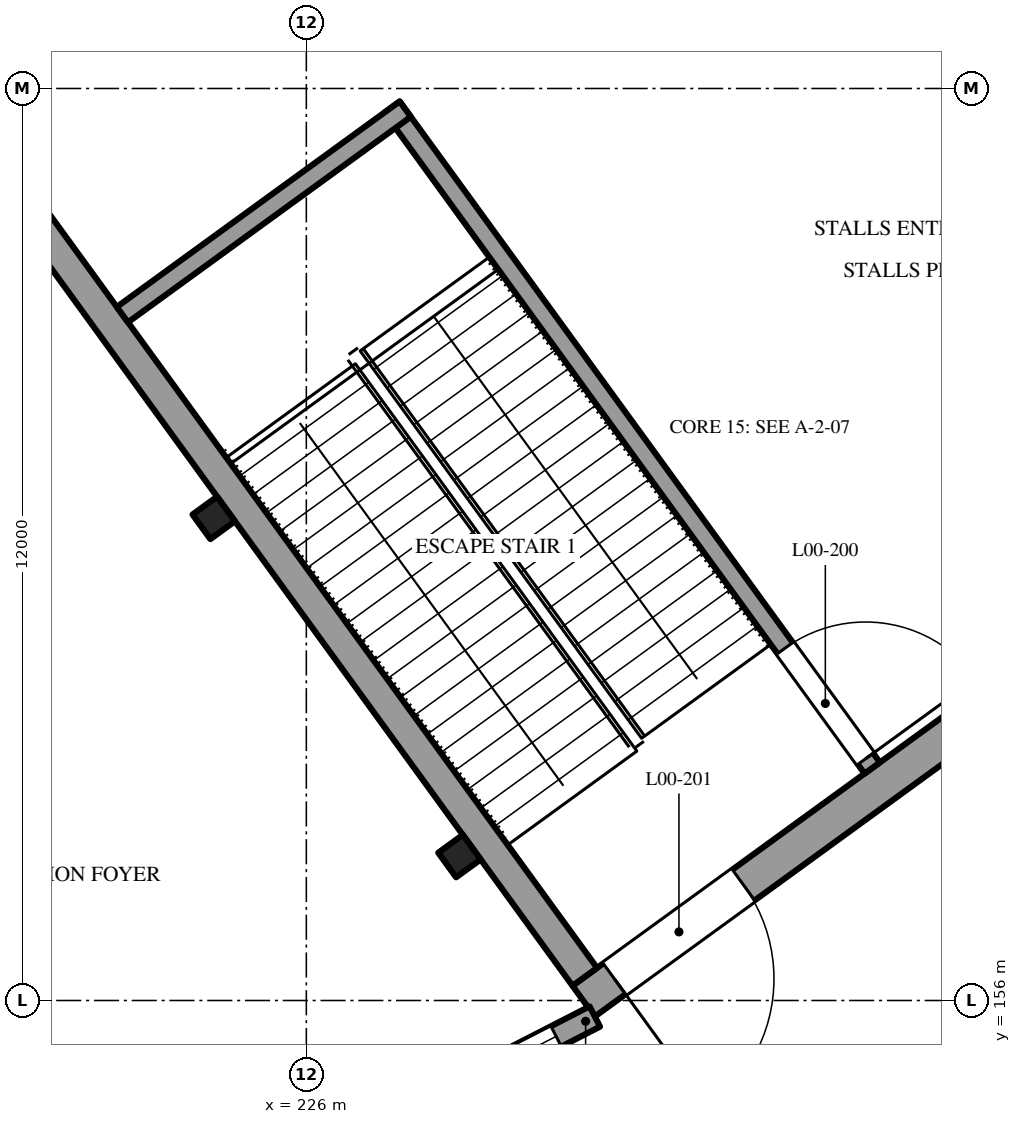
"""IFC4 building model, lengths in metres.
Left out: names, types, materials, properties, quantities, classifications, styles, units other than length and angle.
Written with IfcOpenShell. Run it as: python <this file> out.ifc"""

import sys

from ifc_helpers import new_model, si_unit, direction, frame, frame_2d, origin, origin_2d, place, context, subcontext, project, spatial, rectangle, extrude, element, fill, save


model = new_model("IFC4")
c1 = context("Model", 3, precision=1e-05, world=origin(), true_north=direction((0.0, 1.0)))
c2 = subcontext(c1, "Body", "Model", "MODEL_VIEW")
j1 = project(units=[si_unit("LENGTHUNIT", "METRE"), si_unit("PLANEANGLEUNIT", "RADIAN")], contexts=[c1])
p1 = place(None, origin())
s1 = spatial("IfcSite", under=j1, at=p1, CompositionType="ELEMENT")
p2 = place(p1, origin())
s2 = spatial("IfcBuilding", under=s1, at=p2, CompositionType="ELEMENT")
p3 = place(p2, origin())
s3 = spatial("IfcBuildingStorey", under=s2, at=p3, CompositionType="ELEMENT", Elevation=0.0)
p4 = place(p3, frame((229.649, 155.991, -0.3), z_axis=(0.0, 0.0, 1.0), x_axis=(0.809016008294, 0.587786609514, 0.0)))
e1 = element("IfcWall", 1, at=p4, inside=s3, PredefinedType="SOLIDWALL", context=c2, shape_type="SweptSolid", body=[
    extrude(rectangle(XDim=60.4, YDim=0.5, at=frame_2d((30.2, 0.0))), origin(), (0.0, 0.0, 1.0), 7.5),
])
p5 = place(p4, frame((41.2, 0.0, 0.3)))
e2 = element("IfcOpeningElement", 2, at=p5, cuts=e1, PredefinedType="OPENING", context=c2, shape_type="SweptSolid", body=[
    extrude(rectangle(XDim=2.4, YDim=2.4, at=frame_2d((1.2, 1.2))), frame((0.0, 0.26, 0.0), z_axis=(0.0, -1.0, 0.0), x_axis=(1.0, 0.0, 0.0)), (0.0, 0.0, 1.0), 0.52),
])
p6 = place(p4, frame((33.2, 0.0, 0.3)))
e3 = element("IfcOpeningElement", 3, at=p6, cuts=e1, PredefinedType="OPENING", context=c2, shape_type="SweptSolid", body=[
    extrude(rectangle(XDim=2.4, YDim=2.4, at=frame_2d((1.2, 1.2))), frame((0.0, 0.26, 0.0), z_axis=(0.0, -1.0, 0.0), x_axis=(1.0, 0.0, 0.0)), (0.0, 0.0, 1.0), 0.52),
])
p7 = place(p4, frame((0.5, 0.0, 0.3)))
e4 = element("IfcOpeningElement", 4, at=p7, cuts=e1, PredefinedType="OPENING", context=c2, shape_type="SweptSolid", body=[
    extrude(rectangle(XDim=2.1, YDim=2.1, at=frame_2d((1.05, 1.05))), frame((0.0, 0.26, 0.0), z_axis=(0.0, -1.0, 0.0), x_axis=(1.0, 0.0, 0.0)), (0.0, 0.0, 1.0), 0.52),
])
p8 = place(p4, frame((15.6, 0.0, 0.3)))
e5 = element("IfcOpeningElement", 5, at=p8, cuts=e1, PredefinedType="OPENING", context=c2, shape_type="SweptSolid", body=[
    extrude(rectangle(XDim=2.1, YDim=2.1, at=frame_2d((1.05, 1.05))), frame((0.0, 0.26, 0.0), z_axis=(0.0, -1.0, 0.0), x_axis=(1.0, 0.0, 0.0)), (0.0, 0.0, 1.0), 0.52),
])
p9 = place(p4, frame((50.75, 0.0, 2.4)))
e6 = element("IfcOpeningElement", 6, at=p9, cuts=e1, PredefinedType="OPENING", context=c2, shape_type="SweptSolid", body=[
    extrude(rectangle(XDim=1.2, YDim=1.2, at=frame_2d((0.6, 0.6))), frame((0.0, 0.26, 0.0), z_axis=(0.0, -1.0, 0.0), x_axis=(1.0, 0.0, 0.0)), (0.0, 0.0, 1.0), 0.52),
])
p10 = place(p4, frame((53.45, 0.0, 2.4)))
e7 = element("IfcOpeningElement", 7, at=p10, cuts=e1, PredefinedType="OPENING", context=c2, shape_type="SweptSolid", body=[
    extrude(rectangle(XDim=1.5, YDim=1.2, at=frame_2d((0.75, 0.6))), frame((0.0, 0.26, 0.0), z_axis=(0.0, -1.0, 0.0), x_axis=(1.0, 0.0, 0.0)), (0.0, 0.0, 1.0), 0.52),
])
p11 = place(p4, frame((57.35, 0.0, 2.4)))
e8 = element("IfcOpeningElement", 8, at=p11, cuts=e1, PredefinedType="OPENING", context=c2, shape_type="SweptSolid", body=[
    extrude(rectangle(XDim=1.5, YDim=1.2, at=frame_2d((0.75, 0.6))), frame((0.0, 0.26, 0.0), z_axis=(0.0, -1.0, 0.0), x_axis=(1.0, 0.0, 0.0)), (0.0, 0.0, 1.0), 0.52),
])
p12 = place(p3, frame((229.664, 156.311, -0.3), z_axis=(0.0, 0.0, 1.0), x_axis=(-0.587784977279, 0.809017194184, 0.0)))
e9 = element("IfcWall", 9, at=p12, inside=s3, PredefinedType="SOLIDWALL", context=c2, shape_type="SweptSolid", body=[
    extrude(rectangle(XDim=53.5, YDim=0.4, at=frame_2d((26.75, 0.0))), origin(), (0.0, 0.0, 1.0), 7.5),
])
p13 = place(p12, frame((13.3, 0.0, 0.3)))
e10 = element("IfcOpeningElement", 10, at=p13, cuts=e9, PredefinedType="OPENING", context=c2, shape_type="SweptSolid", body=[
    extrude(rectangle(XDim=2.4, YDim=2.4, at=frame_2d((1.2, 1.2))), frame((0.0, 0.21, 0.0), z_axis=(0.0, -1.0, 0.0), x_axis=(1.0, 0.0, 0.0)), (0.0, 0.0, 1.0), 0.42),
])
p14 = place(p12, frame((16.8, 0.0, 0.3)))
e11 = element("IfcOpeningElement", 11, at=p14, cuts=e9, PredefinedType="OPENING", context=c2, shape_type="SweptSolid", body=[
    extrude(rectangle(XDim=2.4, YDim=2.4, at=frame_2d((1.2, 1.2))), frame((0.0, 0.21, 0.0), z_axis=(0.0, -1.0, 0.0), x_axis=(1.0, 0.0, 0.0)), (0.0, 0.0, 1.0), 0.42),
])
p15 = place(p12, frame((20.3, 0.0, 0.3)))
e12 = element("IfcOpeningElement", 12, at=p15, cuts=e9, PredefinedType="OPENING", context=c2, shape_type="SweptSolid", body=[
    extrude(rectangle(XDim=2.4, YDim=2.4, at=frame_2d((1.2, 1.2))), frame((0.0, 0.21, 0.0), z_axis=(0.0, -1.0, 0.0), x_axis=(1.0, 0.0, 0.0)), (0.0, 0.0, 1.0), 0.42),
])
p16 = place(p12, frame((23.8, 0.0, 0.3)))
e13 = element("IfcOpeningElement", 13, at=p16, cuts=e9, PredefinedType="OPENING", context=c2, shape_type="SweptSolid", body=[
    extrude(rectangle(XDim=2.4, YDim=2.4, at=frame_2d((1.2, 1.2))), frame((0.0, 0.21, 0.0), z_axis=(0.0, -1.0, 0.0), x_axis=(1.0, 0.0, 0.0)), (0.0, 0.0, 1.0), 0.42),
])
p17 = place(p12, frame((27.3, 0.0, 0.3)))
e14 = element("IfcOpeningElement", 14, at=p17, cuts=e9, PredefinedType="OPENING", context=c2, shape_type="SweptSolid", body=[
    extrude(rectangle(XDim=2.4, YDim=2.4, at=frame_2d((1.2, 1.2))), frame((0.0, 0.21, 0.0), z_axis=(0.0, -1.0, 0.0), x_axis=(1.0, 0.0, 0.0)), (0.0, 0.0, 1.0), 0.42),
])
p18 = place(p12, frame((30.8, 0.0, 0.3)))
e15 = element("IfcOpeningElement", 15, at=p18, cuts=e9, PredefinedType="OPENING", context=c2, shape_type="SweptSolid", body=[
    extrude(rectangle(XDim=2.4, YDim=2.4, at=frame_2d((1.2, 1.2))), frame((0.0, 0.21, 0.0), z_axis=(0.0, -1.0, 0.0), x_axis=(1.0, 0.0, 0.0)), (0.0, 0.0, 1.0), 0.42),
])
p19 = place(p12, frame((34.3, 0.0, 0.3)))
e16 = element("IfcOpeningElement", 16, at=p19, cuts=e9, PredefinedType="OPENING", context=c2, shape_type="SweptSolid", body=[
    extrude(rectangle(XDim=2.4, YDim=2.4, at=frame_2d((1.2, 1.2))), frame((0.0, 0.21, 0.0), z_axis=(0.0, -1.0, 0.0), x_axis=(1.0, 0.0, 0.0)), (0.0, 0.0, 1.0), 0.42),
])
p20 = place(p12, frame((37.8, 0.0, 0.3)))
e17 = element("IfcOpeningElement", 17, at=p20, cuts=e9, PredefinedType="OPENING", context=c2, shape_type="SweptSolid", body=[
    extrude(rectangle(XDim=2.4, YDim=2.4, at=frame_2d((1.2, 1.2))), frame((0.0, 0.21, 0.0), z_axis=(0.0, -1.0, 0.0), x_axis=(1.0, 0.0, 0.0)), (0.0, 0.0, 1.0), 0.42),
])
for number, where, z_axis, x_axis in (
    (18, (228.015, 157.9, -0.3), (0.0, 0.0, 1.0), (0.809, 0.588, 0.0)),
    (19, (224.782, 162.35, -0.3), (0.0, 0.0, 1.0), (0.809, 0.588, 0.0)),
):
    element("IfcColumn", number, at=place(p3, frame(where, z_axis=z_axis, x_axis=x_axis)), inside=s3, PredefinedType="COLUMN", context=c2, shape_type="SweptSolid", body=[
        extrude(rectangle(XDim=0.4, YDim=0.4, at=origin_2d()), origin(), (0.0, 0.0, 1.0), 7.5),
    ])
p21 = place(p3, frame((233.446, 159.059, 0.0), z_axis=(0.0, 0.0, 1.0), x_axis=(-0.587801633775, 0.809005092278, 0.0)))
e20 = element("IfcWall", 20, at=p21, inside=s3, PredefinedType="SOLIDWALL", context=c2, shape_type="SweptSolid", body=[
    extrude(rectangle(XDim=10.75, YDim=0.25, at=frame_2d((5.375, 0.0))), origin(), (0.0, 0.0, 1.0), 7.2),
])
p22 = place(p21, frame((0.15, 0.0, 0.0)))
e21 = element("IfcOpeningElement", 21, at=p22, cuts=e20, PredefinedType="OPENING", context=c2, shape_type="SweptSolid", body=[
    extrude(rectangle(XDim=1.8, YDim=2.1, at=frame_2d((0.9, 1.05))), frame((0.0, 0.135, 0.0), z_axis=(0.0, -1.0, 0.0), x_axis=(1.0, 0.0, 0.0)), (0.0, 0.0, 1.0), 0.27),
])
p23 = place(p3, frame((223.58, 165.024, 0.0), z_axis=(0.0, 0.0, 1.0), x_axis=(0.809009113768, 0.587796098864, 0.0)))
e22 = element("IfcWall", 22, at=p23, inside=s3, PredefinedType="SOLIDWALL", context=c2, shape_type="SweptSolid", body=[
    extrude(rectangle(XDim=4.6, YDim=0.25, at=frame_2d((2.3, 0.0))), origin(), (0.0, 0.0, 1.0), 7.2),
])
p24 = place(p3, frame((218.0, 149.73, -0.3), z_axis=(0.0, 0.0, 1.0), x_axis=(0.889510193678, 0.456915326228, 0.0)))
e23 = element("IfcWall", 23, at=p24, inside=s3, PredefinedType="SOLIDWALL", context=c2, shape_type="SweptSolid", body=[
    extrude(rectangle(XDim=13.261, YDim=0.3, at=frame_2d((6.63, 0.0))), origin(), (0.0, 0.0, 1.0), 7.5),
])
p25 = place(p24, frame((0.572, 0.0, 0.3)))
e24 = element("IfcOpeningElement", 24, at=p25, cuts=e23, PredefinedType="OPENING", context=c2, shape_type="SweptSolid", body=[
    extrude(rectangle(XDim=2.6, YDim=6.0, at=frame_2d((1.3, 3.0))), frame((0.0, 0.16, 0.0), z_axis=(0.0, -1.0, 0.0), x_axis=(1.0, 0.0, 0.0)), (0.0, 0.0, 1.0), 0.32),
])
p26 = place(p24, frame((3.744, 0.0, 0.3)))
e25 = element("IfcOpeningElement", 25, at=p26, cuts=e23, PredefinedType="OPENING", context=c2, shape_type="SweptSolid", body=[
    extrude(rectangle(XDim=2.6, YDim=6.0, at=frame_2d((1.3, 3.0))), frame((0.0, 0.16, 0.0), z_axis=(0.0, -1.0, 0.0), x_axis=(1.0, 0.0, 0.0)), (0.0, 0.0, 1.0), 0.32),
])
p27 = place(p24, frame((6.917, 0.0, 0.3)))
e26 = element("IfcOpeningElement", 26, at=p27, cuts=e23, PredefinedType="OPENING", context=c2, shape_type="SweptSolid", body=[
    extrude(rectangle(XDim=2.6, YDim=6.0, at=frame_2d((1.3, 3.0))), frame((0.0, 0.16, 0.0), z_axis=(0.0, -1.0, 0.0), x_axis=(1.0, 0.0, 0.0)), (0.0, 0.0, 1.0), 0.32),
])
p28 = place(p24, frame((10.089, 0.0, 0.3)))
e27 = element("IfcOpeningElement", 27, at=p28, cuts=e23, PredefinedType="OPENING", context=c2, shape_type="SweptSolid", body=[
    extrude(rectangle(XDim=2.6, YDim=6.0, at=frame_2d((1.3, 3.0))), frame((0.0, 0.16, 0.0), z_axis=(0.0, -1.0, 0.0), x_axis=(1.0, 0.0, 0.0)), (0.0, 0.0, 1.0), 0.32),
])
p29 = place(p22, frame((1.8, 0.0, 0.0), z_axis=(0.0, 0.0, 1.0), x_axis=(-1.0, 0.0, 0.0)))
e28 = element("IfcDoor", 28, at=p29, inside=s3, OperationType="DOUBLE_DOOR_SINGLE_SWING", PredefinedType="DOOR", context=c2, shape_type="SweptSolid", body=[
    extrude(rectangle(XDim=1.8, YDim=2.1, at=frame_2d((0.9, 1.05))), frame((0.0, 0.025, 0.0), z_axis=(0.0, -1.0, 0.0), x_axis=(1.0, 0.0, 0.0)), (0.0, 0.0, 1.0), 0.05),
])
fill(e21, e28)
p30 = place(p7, frame((2.1, 0.0, 0.0), z_axis=(0.0, 0.0, 1.0), x_axis=(-1.0, 0.0, 0.0)))
e29 = element("IfcDoor", 29, at=p30, inside=s3, OperationType="DOUBLE_DOOR_SINGLE_SWING", PredefinedType="DOOR", context=c2, shape_type="SweptSolid", body=[
    extrude(rectangle(XDim=2.1, YDim=2.1, at=frame_2d((1.05, 1.05))), frame((0.0, 0.025, 0.0), z_axis=(0.0, -1.0, 0.0), x_axis=(1.0, 0.0, 0.0)), (0.0, 0.0, 1.0), 0.05),
])
fill(e4, e29)
p31 = place(p28, origin())
e30 = element("IfcWindow", 30, at=p31, inside=s3, PartitioningType="SINGLE_PANEL", PredefinedType="WINDOW", context=c2, shape_type="SweptSolid", body=[
    extrude(rectangle(XDim=2.6, YDim=6.0, at=frame_2d((1.3, 3.0))), frame((0.0, 0.03, 0.0), z_axis=(0.0, -1.0, 0.0), x_axis=(1.0, 0.0, 0.0)), (0.0, 0.0, 1.0), 0.06),
])
fill(e27, e30)
save(model, sys.argv[1])
